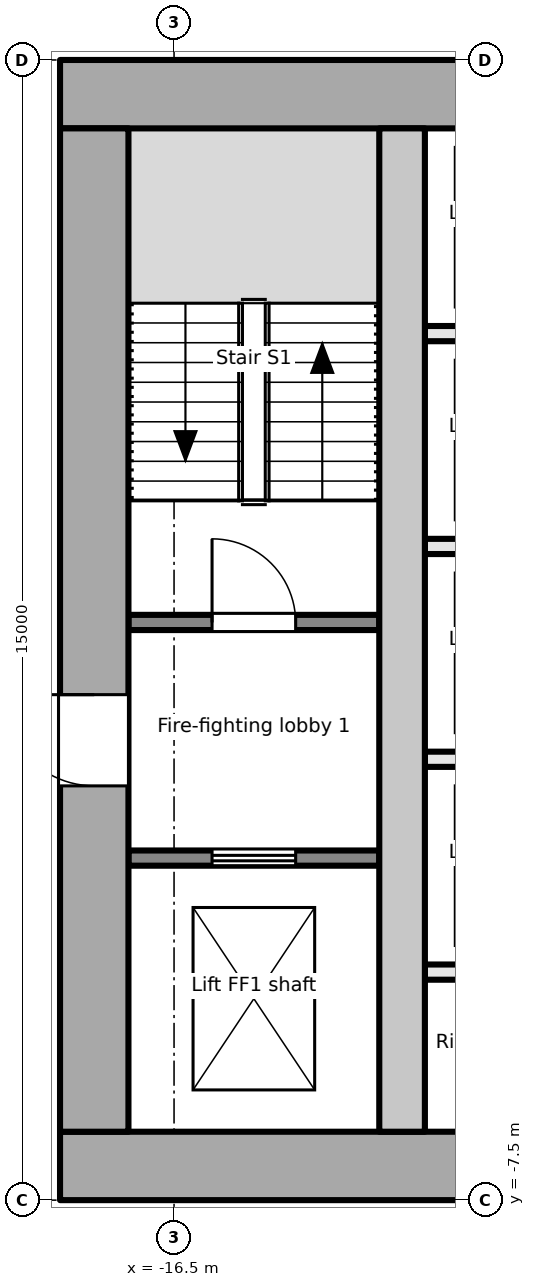
"""IFC4 building model, lengths in metres.
Left out: names, types, materials, properties, quantities, classifications, styles, units other than length and angle.
Written with IfcOpenShell. Run it as: python <this file> out.ifc"""

import sys

from ifc_helpers import new_model, si_unit, direction, frame, frame_2d, origin, place, context, subcontext, project, spatial, rectangle, extrude, element, fill, save


model = new_model("IFC4")
c1 = context("Model", 3, precision=1e-05, world=origin(), true_north=direction((0.0, 1.0)))
c2 = subcontext(c1, "Body", "Model", "MODEL_VIEW")
j1 = project(units=[si_unit("LENGTHUNIT", "METRE"), si_unit("PLANEANGLEUNIT", "RADIAN")], contexts=[c1])
p1 = place(None, origin())
s1 = spatial("IfcSite", under=j1, at=p1, CompositionType="ELEMENT")
p2 = place(p1, origin())
s2 = spatial("IfcBuilding", under=s1, at=p2, CompositionType="ELEMENT")
p3 = place(p2, frame((0.0, 0.0, 87.7)))
s3 = spatial("IfcBuildingStorey", under=s2, at=p3, CompositionType="ELEMENT", Elevation=87.7)
p4 = place(p3, frame((-18.0, -7.05, -0.2), z_axis=(0.0, 0.0, 1.0), x_axis=(1.0, 0.0, 0.0)))
e1 = element("IfcWall", 1, at=p4, inside=s3, PredefinedType="SHEAR", context=c2, shape_type="SweptSolid", body=[
    extrude(rectangle(XDim=36.0, YDim=0.9, at=frame_2d((18.0, 0.0))), origin(), (0.0, 0.0, 1.0), 4.0),
])
p5 = place(p4, frame((7.8, 0.0, 0.2)))
e2 = element("IfcOpeningElement", 2, at=p5, cuts=e1, PredefinedType="OPENING", context=c2, shape_type="SweptSolid", body=[
    extrude(rectangle(XDim=2.4, YDim=2.1, at=frame_2d((1.2, 1.05))), frame((0.0, 0.46, 0.0), z_axis=(0.0, -1.0, 0.0), x_axis=(1.0, 0.0, 0.0)), (0.0, 0.0, 1.0), 0.921),
])
p6 = place(p4, frame((17.4, 0.0, 0.2)))
e3 = element("IfcOpeningElement", 3, at=p6, cuts=e1, PredefinedType="OPENING", context=c2, shape_type="SweptSolid", body=[
    extrude(rectangle(XDim=1.2, YDim=2.1, at=frame_2d((0.6, 1.05))), frame((0.0, 0.46, 0.0), z_axis=(0.0, -1.0, 0.0), x_axis=(1.0, 0.0, 0.0)), (0.0, 0.0, 1.0), 0.921),
])
p7 = place(p4, frame((26.1, 0.0, 0.2)))
e4 = element("IfcOpeningElement", 4, at=p7, cuts=e1, PredefinedType="OPENING", context=c2, shape_type="SweptSolid", body=[
    extrude(rectangle(XDim=2.4, YDim=2.1, at=frame_2d((1.2, 1.05))), frame((0.0, 0.46, 0.0), z_axis=(0.0, -1.0, 0.0), x_axis=(1.0, 0.0, 0.0)), (0.0, 0.0, 1.0), 0.921),
])
p8 = place(p3, frame((-18.0, 7.05, -0.2), z_axis=(0.0, 0.0, 1.0), x_axis=(1.0, 0.0, 0.0)))
e5 = element("IfcWall", 5, at=p8, inside=s3, PredefinedType="SHEAR", context=c2, shape_type="SweptSolid", body=[
    extrude(rectangle(XDim=36.0, YDim=0.9, at=frame_2d((18.0, 0.0))), origin(), (0.0, 0.0, 1.0), 4.0),
])
p9 = place(p3, frame((-17.55, -6.6, -0.2), z_axis=(0.0, 0.0, 1.0), x_axis=(0.0, 1.0, 0.0)))
e6 = element("IfcWall", 6, at=p9, inside=s3, PredefinedType="SHEAR", context=c2, shape_type="SweptSolid", body=[
    extrude(rectangle(XDim=13.2, YDim=0.9, at=frame_2d((6.6, 0.0))), origin(), (0.0, 0.0, 1.0), 4.0),
])
p10 = place(p9, frame((4.55, 0.0, 0.2)))
e7 = element("IfcOpeningElement", 7, at=p10, cuts=e6, PredefinedType="OPENING", context=c2, shape_type="SweptSolid", body=[
    extrude(rectangle(XDim=1.2, YDim=2.1, at=frame_2d((0.6, 1.05))), frame((0.0, 0.46, 0.0), z_axis=(0.0, -1.0, 0.0), x_axis=(1.0, 0.0, 0.0)), (0.0, 0.0, 1.0), 0.921),
])
p11 = place(p3, frame((-13.5, -6.6, -0.2), z_axis=(0.0, 0.0, 1.0), x_axis=(0.0, 1.0, 0.0)))
e8 = element("IfcWall", 8, at=p11, inside=s3, PredefinedType="SHEAR", context=c2, shape_type="SweptSolid", body=[
    extrude(rectangle(XDim=13.2, YDim=0.6, at=frame_2d((6.6, 0.0))), origin(), (0.0, 0.0, 1.0), 4.0),
])
p12 = place(p3, frame((-17.1, -3.0, 0.0), z_axis=(0.0, 0.0, 1.0), x_axis=(1.0, 0.0, 0.0)))
e9 = element("IfcWall", 9, at=p12, inside=s3, PredefinedType="PARTITIONING", context=c2, shape_type="SweptSolid", body=[
    extrude(rectangle(XDim=3.3, YDim=0.2, at=frame_2d((1.65, 0.0))), origin(), (0.0, 0.0, 1.0), 3.8),
])
p13 = place(p12, frame((1.1, 0.0, 0.0)))
e10 = element("IfcOpeningElement", 10, at=p13, cuts=e9, PredefinedType="OPENING", context=c2, shape_type="SweptSolid", body=[
    extrude(rectangle(XDim=1.1, YDim=2.1, at=frame_2d((0.55, 1.05))), frame((0.0, 0.111, 0.0), z_axis=(0.0, -1.0, 0.0), x_axis=(1.0, 0.0, 0.0)), (0.0, 0.0, 1.0), 0.221),
])
p14 = place(p3, frame((-17.1, 0.1, 0.0), z_axis=(0.0, 0.0, 1.0), x_axis=(1.0, 0.0, 0.0)))
e11 = element("IfcWall", 11, at=p14, inside=s3, PredefinedType="PARTITIONING", context=c2, shape_type="SweptSolid", body=[
    extrude(rectangle(XDim=3.3, YDim=0.2, at=frame_2d((1.65, 0.0))), origin(), (0.0, 0.0, 1.0), 3.8),
])
p15 = place(p14, frame((1.1, 0.0, 0.0)))
e12 = element("IfcOpeningElement", 12, at=p15, cuts=e11, PredefinedType="OPENING", context=c2, shape_type="SweptSolid", body=[
    extrude(rectangle(XDim=1.1, YDim=2.1, at=frame_2d((0.55, 1.05))), frame((0.0, 0.111, 0.0), z_axis=(0.0, -1.0, 0.0), x_axis=(1.0, 0.0, 0.0)), (0.0, 0.0, 1.0), 0.221),
])
for number, where, z_axis, x_axis in (
    (13, (-13.2, -1.7, 0.0), (0.0, 0.0, 1.0), (1.0, 0.0, 0.0)),
    (14, (-13.2, 1.1, 0.0), (0.0, 0.0, 1.0), (1.0, 0.0, 0.0)),
    (15, (-13.2, 3.9, 0.0), (0.0, 0.0, 1.0), (1.0, 0.0, 0.0)),
    (16, (-13.2, -4.5, 0.0), (0.0, 0.0, 1.0), (1.0, 0.0, 0.0)),
):
    element("IfcWall", number, at=place(p3, frame(where, z_axis=z_axis, x_axis=x_axis)), inside=s3, PredefinedType="PARTITIONING", context=c2, shape_type="SweptSolid", body=[
        extrude(rectangle(XDim=2.3, YDim=0.2, at=frame_2d((1.15, 0.0))), origin(), (0.0, 0.0, 1.0), 3.8),
    ])
p16 = place(p13, origin())
e17 = element("IfcDoor", 17, at=p16, inside=s3, OperationType="DOUBLE_DOOR_SLIDING", PredefinedType="DOOR", context=c2, shape_type="SweptSolid", body=[
    extrude(rectangle(XDim=1.1, YDim=2.1, at=frame_2d((0.55, 1.05))), frame((0.0, 0.025, 0.0), z_axis=(0.0, -1.0, 0.0), x_axis=(1.0, 0.0, 0.0)), (0.0, 0.0, 1.0), 0.05),
])
fill(e10, e17)
p17 = place(p10, origin())
e18 = element("IfcDoor", 18, at=p17, inside=s3, OperationType="SINGLE_SWING_RIGHT", PredefinedType="DOOR", context=c2, shape_type="SweptSolid", body=[
    extrude(rectangle(XDim=1.2, YDim=2.1, at=frame_2d((0.6, 1.05))), frame((0.0, 0.025, 0.0), z_axis=(0.0, -1.0, 0.0), x_axis=(1.0, 0.0, 0.0)), (0.0, 0.0, 1.0), 0.05),
])
fill(e7, e18)
p18 = place(p15, origin())
e19 = element("IfcDoor", 19, at=p18, inside=s3, OperationType="SINGLE_SWING_LEFT", PredefinedType="DOOR", context=c2, shape_type="SweptSolid", body=[
    extrude(rectangle(XDim=1.1, YDim=2.1, at=frame_2d((0.55, 1.05))), frame((0.0, 0.025, 0.0), z_axis=(0.0, -1.0, 0.0), x_axis=(1.0, 0.0, 0.0)), (0.0, 0.0, 1.0), 0.05),
])
fill(e12, e19)
save(model, sys.argv[1])
